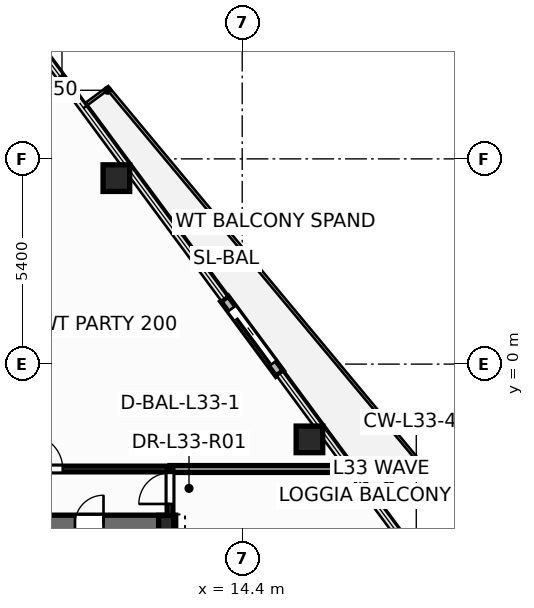
"""IFC4 building model, lengths in metres.
Left out: names, types, materials, properties, quantities, classifications, styles, units other than length and angle.
Written with IfcOpenShell. Run it as: python <this file> out.ifc"""

import sys

from ifc_helpers import new_model, si_unit, direction, frame, frame_2d, origin, origin_2d, place, context, subcontext, project, spatial, rectangle, hollow_circle, i_section, extrude, element, fill, save


model = new_model("IFC4")
c1 = context("Model", 3, precision=1e-05, world=origin(), true_north=direction((0.0, 1.0)))
c2 = subcontext(c1, "Body", "Model", "MODEL_VIEW")
j1 = project(units=[si_unit("LENGTHUNIT", "METRE"), si_unit("PLANEANGLEUNIT", "RADIAN")], contexts=[c1])
p1 = place(None, origin())
s1 = spatial("IfcSite", under=j1, at=p1, CompositionType="ELEMENT")
p2 = place(p1, origin())
s2 = spatial("IfcBuilding", under=s1, at=p2, CompositionType="ELEMENT")
p3 = place(p2, frame((0.0, 0.0, 129.3)))
s3 = spatial("IfcBuildingStorey", under=s2, at=p3, CompositionType="ELEMENT", Elevation=129.3)
for number, where, z_axis, x_axis in (
    (1, (16.169, -1.98, 0.0), (0.0, 0.0, 1.0), (1.0, 0.0, 0.0)),
    (2, (11.089, 4.894, 0.0), (0.0, 0.0, 1.0), (1.0, 0.0, 0.0)),
):
    element("IfcColumn", number, at=place(p3, frame(where, z_axis=z_axis, x_axis=x_axis)), inside=s3, PredefinedType="COLUMN", context=c2, shape_type="SweptSolid", body=[
        extrude(hollow_circle(Radius=0.35, WallThickness=0.03, at=origin_2d()), origin(), (0.0, 0.0, 1.0), 3.6),
    ])
p4 = place(p3, frame((12.4, -4.2, 0.0), z_axis=(0.0, 0.0, 1.0), x_axis=(1.0, 0.0, 0.0)))
e3 = element("IfcColumn", 3, at=p4, inside=s3, PredefinedType="COLUMN", context=c2, shape_type="SweptSolid", body=[
    extrude(i_section(OverallWidth=0.4, OverallDepth=0.44, WebThickness=0.028, FlangeThickness=0.04, at=origin_2d()), origin(), (0.0, 0.0, 1.0), 3.6),
])
p5 = place(p3, frame((15.384, -0.246, -0.015), z_axis=(0.0, 0.0, 1.0), x_axis=(-0.594317914364, 0.804230201289, 0.0)))
e4 = element("IfcWall", 4, at=p5, inside=s3, PredefinedType="STANDARD", context=c2, shape_type="SweptSolid", body=[
    extrude(rectangle(XDim=2.44, YDim=0.24, at=frame_2d((1.22, 0.0))), origin(), (0.0, 0.0, 1.0), 2.807),
])
p6 = place(p5, frame((0.32, 0.0, 0.015)))
e5 = element("IfcOpeningElement", 5, at=p6, cuts=e4, PredefinedType="OPENING", context=c2, shape_type="SweptSolid", body=[
    extrude(rectangle(XDim=1.806, YDim=2.204, at=frame_2d((0.9, 1.102))), frame((0.0, 0.13, 0.0), z_axis=(0.0, -1.0, 0.0), x_axis=(1.0, 0.0, 0.0)), (0.0, 0.0, 1.0), 0.26),
])
p7 = place(p3, frame((-12.65, -4.2, 0.0), z_axis=(0.0, 0.0, 1.0), x_axis=(1.0, 0.0, 0.0)))
e6 = element("IfcWall", 6, at=p7, inside=s3, PredefinedType="SHEAR", context=c2, shape_type="SweptSolid", body=[
    extrude(rectangle(XDim=25.3, YDim=0.45, at=frame_2d((12.65, 0.0))), origin(), (0.0, 0.0, 1.0), 3.6),
])
p8 = place(p7, frame((1.85, 0.0, 0.0)))
e7 = element("IfcOpeningElement", 7, at=p8, cuts=e6, PredefinedType="OPENING", context=c2, shape_type="SweptSolid", body=[
    extrude(rectangle(XDim=0.756, YDim=2.054, at=frame_2d((0.375, 1.027))), frame((0.0, 0.235, 0.0), z_axis=(0.0, -1.0, 0.0), x_axis=(1.0, 0.0, 0.0)), (0.0, 0.0, 1.0), 0.47),
])
p9 = place(p7, frame((22.65, 0.0, 0.0)))
e8 = element("IfcOpeningElement", 8, at=p9, cuts=e6, PredefinedType="OPENING", context=c2, shape_type="SweptSolid", body=[
    extrude(rectangle(XDim=0.756, YDim=2.054, at=frame_2d((0.375, 1.027))), frame((0.0, 0.235, 0.0), z_axis=(0.0, -1.0, 0.0), x_axis=(1.0, 0.0, 0.0)), (0.0, 0.0, 1.0), 0.47),
])
p10 = place(p7, frame((5.85, 0.0, 0.0)))
e9 = element("IfcOpeningElement", 9, at=p10, cuts=e6, PredefinedType="OPENING", context=c2, shape_type="SweptSolid", body=[
    extrude(rectangle(XDim=1.006, YDim=2.104, at=frame_2d((0.5, 1.052))), frame((0.0, 0.235, 0.0), z_axis=(0.0, -1.0, 0.0), x_axis=(1.0, 0.0, 0.0)), (0.0, 0.0, 1.0), 0.47),
])
p11 = place(p7, frame((10.35, 0.0, 0.0)))
e10 = element("IfcOpeningElement", 10, at=p11, cuts=e6, PredefinedType="OPENING", context=c2, shape_type="SweptSolid", body=[
    extrude(rectangle(XDim=1.406, YDim=2.154, at=frame_2d((0.7, 1.077))), frame((0.0, 0.235, 0.0), z_axis=(0.0, -1.0, 0.0), x_axis=(1.0, 0.0, 0.0)), (0.0, 0.0, 1.0), 0.47),
])
p12 = place(p7, frame((18.45, 0.0, 0.0)))
e11 = element("IfcOpeningElement", 11, at=p12, cuts=e6, PredefinedType="OPENING", context=c2, shape_type="SweptSolid", body=[
    extrude(rectangle(XDim=1.006, YDim=2.104, at=frame_2d((0.5, 1.052))), frame((0.0, 0.235, 0.0), z_axis=(0.0, -1.0, 0.0), x_axis=(1.0, 0.0, 0.0)), (0.0, 0.0, 1.0), 0.47),
])
p13 = place(p3, frame((12.5, -2.76, 0.0), z_axis=(0.0, 0.0, 1.0), x_axis=(1.0, 0.0, 0.0)))
e12 = element("IfcWall", 12, at=p13, inside=s3, PredefinedType="PARTITIONING", context=c2, shape_type="SweptSolid", body=[
    extrude(rectangle(XDim=4.743, YDim=0.18, at=frame_2d((2.371, 0.0))), origin(), (0.0, 0.0, 1.0), 2.792),
])
p14 = place(p3, frame((8.462, -2.76, 0.0), z_axis=(0.0, 0.0, 1.0), x_axis=(1.0, 0.0, 0.0)))
e13 = element("IfcWall", 13, at=p14, inside=s3, PredefinedType="PARTITIONING", context=c2, shape_type="SweptSolid", body=[
    extrude(rectangle(XDim=4.038, YDim=0.15, at=frame_2d((2.019, 0.0))), origin(), (0.0, 0.0, 1.0), 3.35),
])
p15 = place(p14, frame((0.316, 0.0, 0.0)))
e14 = element("IfcOpeningElement", 14, at=p15, cuts=e13, PredefinedType="OPENING", context=c2, shape_type="SweptSolid", body=[
    extrude(rectangle(XDim=0.906, YDim=2.104, at=frame_2d((0.45, 1.052))), frame((0.0, 0.085, 0.0), z_axis=(0.0, -1.0, 0.0), x_axis=(1.0, 0.0, 0.0)), (0.0, 0.0, 1.0), 0.17),
])
p16 = place(p3, frame((12.5, -4.24, 0.0), z_axis=(0.0, 0.0, 1.0), x_axis=(0.0, 1.0, 0.0)))
e15 = element("IfcWall", 15, at=p16, inside=s3, PredefinedType="PARTITIONING", context=c2, shape_type="SweptSolid", body=[
    extrude(rectangle(XDim=1.48, YDim=0.15, at=frame_2d((0.74, 0.0))), origin(), (0.0, 0.0, 1.0), 2.325),
])
p17 = place(p16, frame((0.56, 0.0, 0.0)))
e16 = element("IfcOpeningElement", 16, at=p17, cuts=e15, PredefinedType="OPENING", context=c2, shape_type="SweptSolid", body=[
    extrude(rectangle(XDim=0.826, YDim=2.104, at=frame_2d((0.41, 1.052))), frame((0.0, 0.085, 0.0), z_axis=(0.0, -1.0, 0.0), x_axis=(1.0, 0.0, 0.0)), (0.0, 0.0, 1.0), 0.17),
])
p18 = place(p6, origin())
e17 = element("IfcDoor", 17, at=p18, inside=s3, OperationType="SLIDING_TO_LEFT", PredefinedType="DOOR", context=c2, shape_type="SweptSolid", body=[
    extrude(rectangle(XDim=1.8, YDim=2.2, at=frame_2d((0.9, 1.1))), frame((0.0, 0.025, 0.0), z_axis=(0.0, -1.0, 0.0), x_axis=(1.0, 0.0, 0.0)), (0.0, 0.0, 1.0), 0.05),
])
fill(e5, e17)
p19 = place(p9, origin())
e18 = element("IfcDoor", 18, at=p19, inside=s3, OperationType="SINGLE_SWING_RIGHT", PredefinedType="DOOR", context=c2, shape_type="SweptSolid", body=[
    extrude(rectangle(XDim=0.75, YDim=2.05, at=frame_2d((0.375, 1.025))), frame((0.0, 0.025, 0.0), z_axis=(0.0, -1.0, 0.0), x_axis=(1.0, 0.0, 0.0)), (0.0, 0.0, 1.0), 0.05),
])
fill(e8, e18)
p20 = place(p17, origin())
e19 = element("IfcDoor", 19, at=p20, inside=s3, OperationType="SINGLE_SWING_LEFT", PredefinedType="DOOR", context=c2, shape_type="SweptSolid", body=[
    extrude(rectangle(XDim=0.82, YDim=2.1, at=frame_2d((0.41, 1.05))), frame((0.0, 0.025, 0.0), z_axis=(0.0, -1.0, 0.0), x_axis=(1.0, 0.0, 0.0)), (0.0, 0.0, 1.0), 0.05),
])
fill(e16, e19)
p21 = place(p15, origin())
e20 = element("IfcDoor", 20, at=p21, inside=s3, OperationType="SINGLE_SWING_LEFT", PredefinedType="DOOR", context=c2, shape_type="SweptSolid", body=[
    extrude(rectangle(XDim=0.9, YDim=2.1, at=frame_2d((0.45, 1.05))), frame((0.0, 0.025, 0.0), z_axis=(0.0, -1.0, 0.0), x_axis=(1.0, 0.0, 0.0)), (0.0, 0.0, 1.0), 0.05),
])
fill(e14, e20)
save(model, sys.argv[1])
